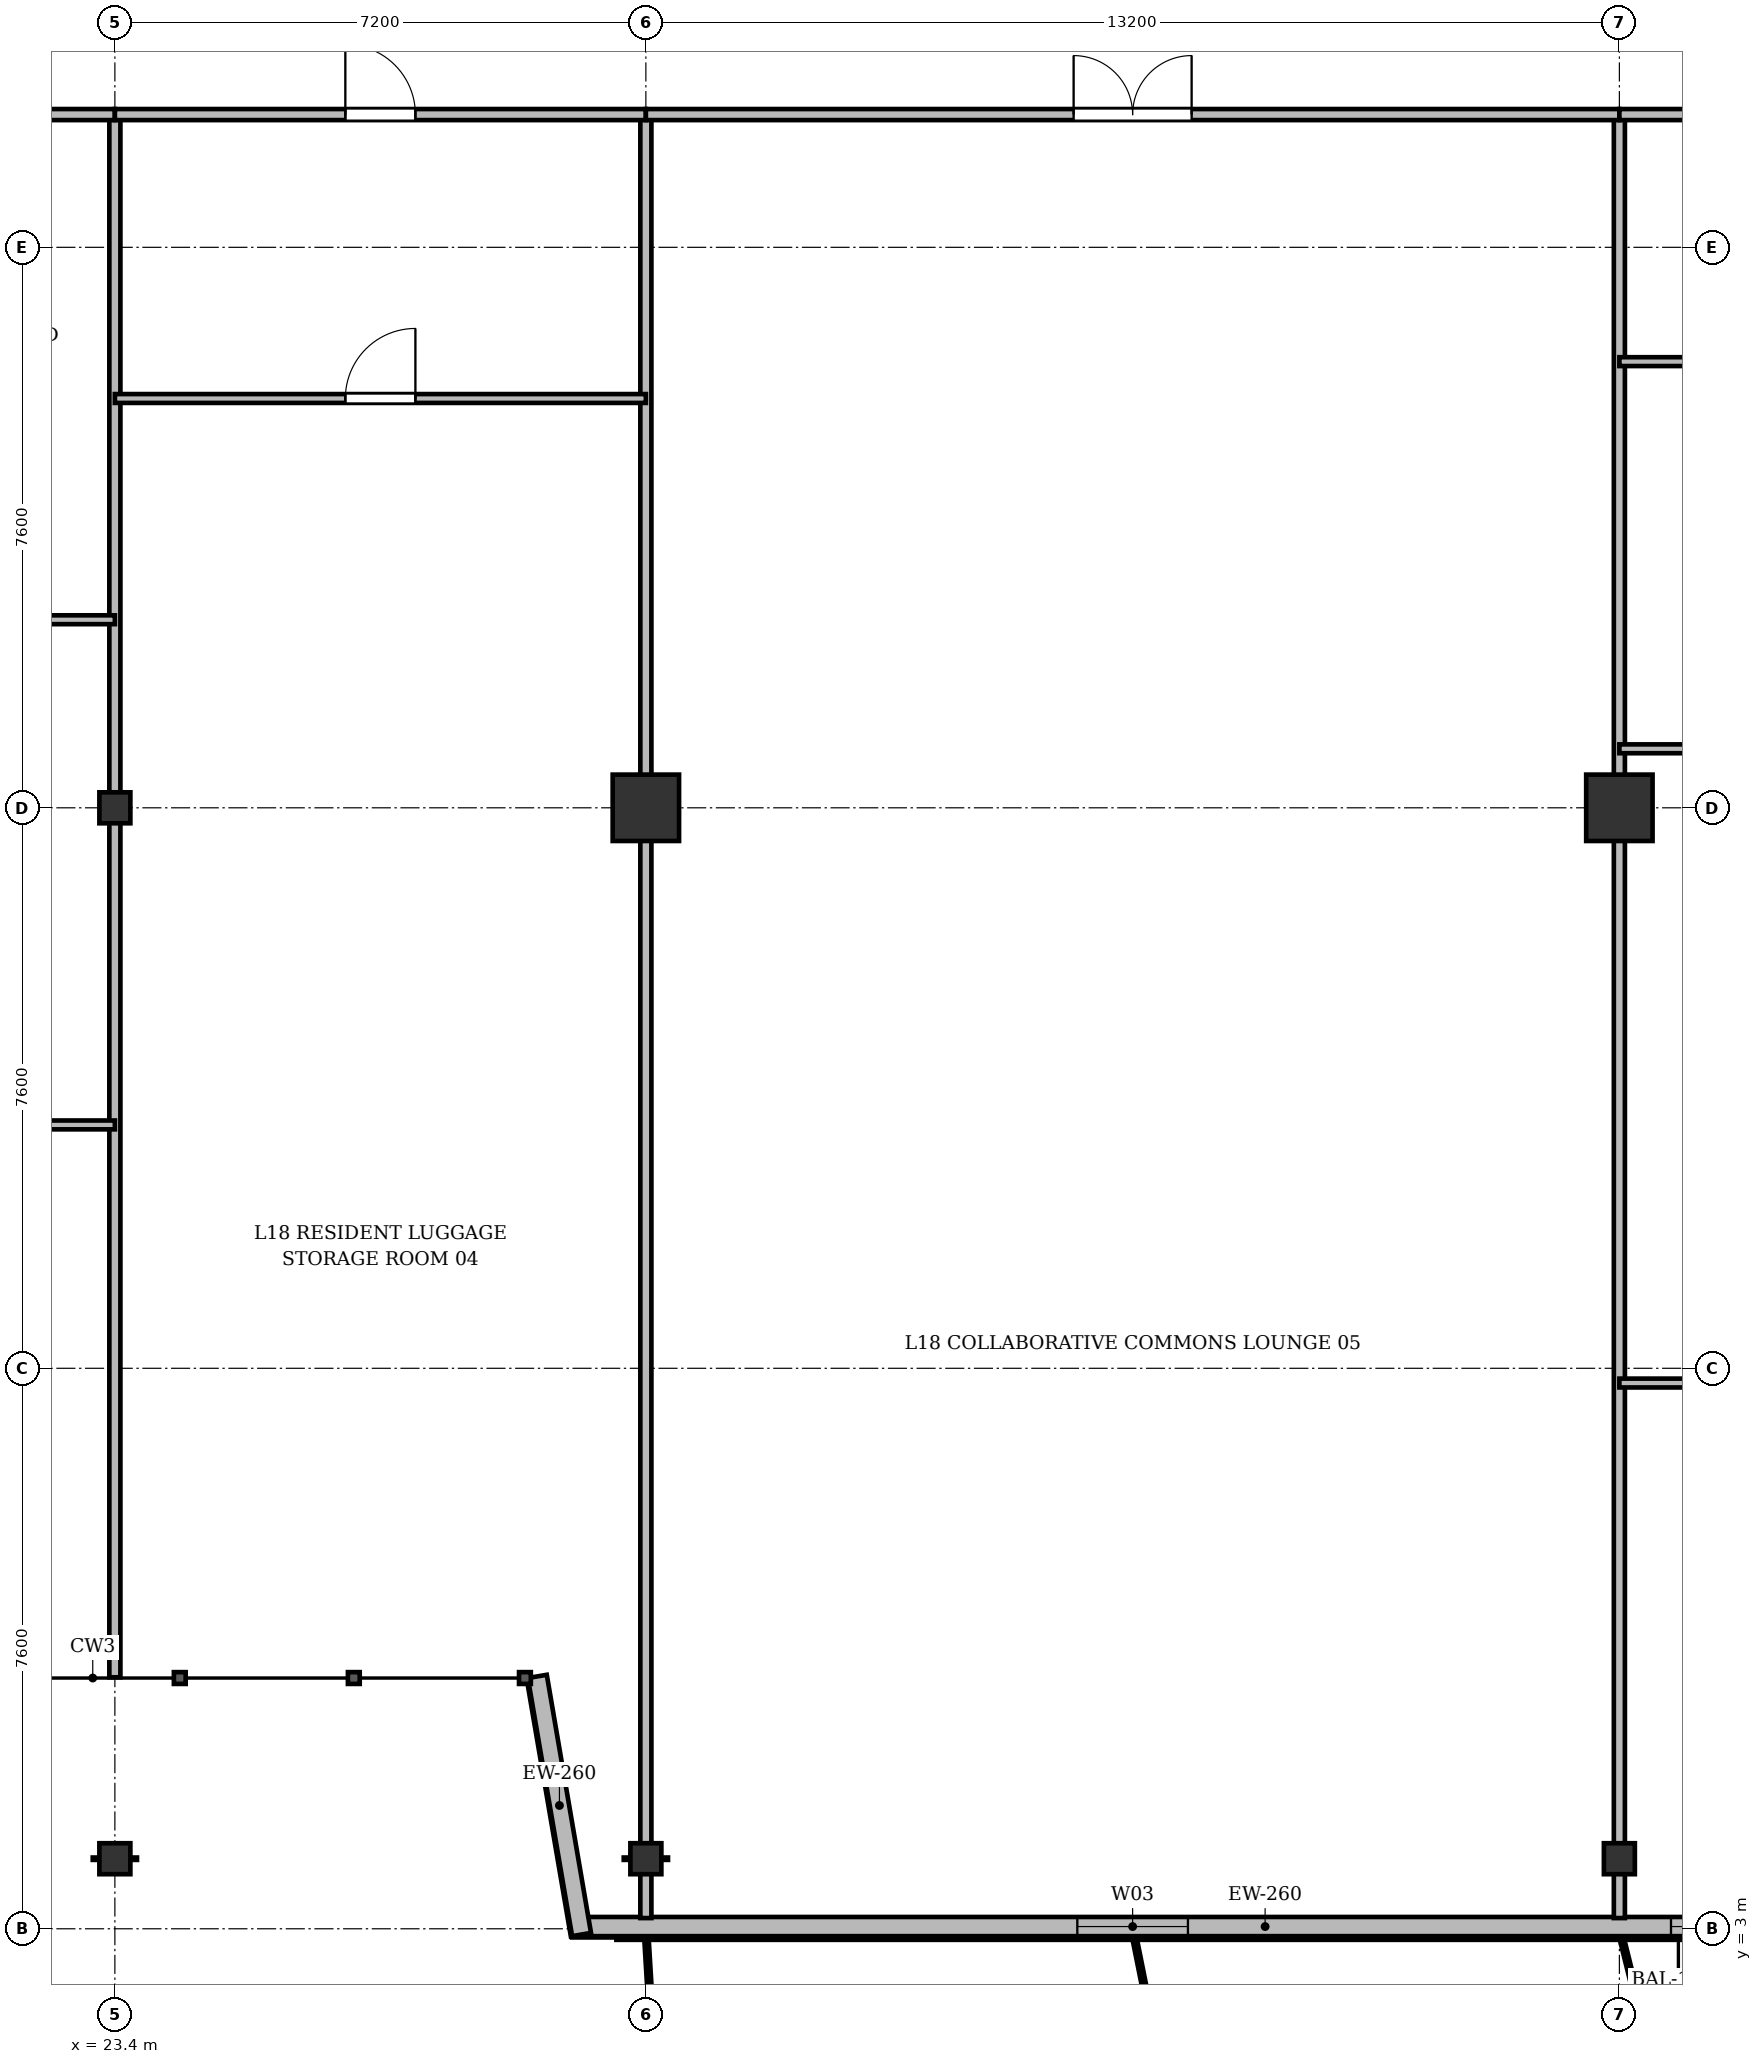
"""IFC4 building model, lengths in metres.
Left out: names, types, materials, properties, quantities, classifications, styles, units other than length and angle.
Written with IfcOpenShell. Run it as: python <this file> out.ifc"""

import sys

from ifc_helpers import new_model, si_unit, direction, frame, frame_2d, origin, origin_2d, place, context, subcontext, project, spatial, rectangle, i_section, extrude, source, transform, mapped, element, fill, save


model = new_model("IFC4")
c1 = context("Model", 3, precision=1e-05, world=origin(), true_north=direction((0.0, 1.0)))
c2 = subcontext(c1, "Body", "Model", "MODEL_VIEW")
j1 = project(units=[si_unit("LENGTHUNIT", "METRE"), si_unit("PLANEANGLEUNIT", "RADIAN")], contexts=[c1])
p1 = place(None, origin())
s1 = spatial("IfcSite", under=j1, at=p1, CompositionType="ELEMENT")
p2 = place(p1, origin())
s2 = spatial("IfcBuilding", under=s1, at=p2, CompositionType="ELEMENT")
p3 = place(p2, frame((0.0, 0.0, 70.3)))
s3 = spatial("IfcBuildingStorey", under=s2, at=p3, CompositionType="ELEMENT", Elevation=70.3)
m1 = source(origin(), c2, "Body", "SweptSolid", [
    extrude(i_section(OverallWidth=0.42, OverallDepth=0.42, WebThickness=0.026, FlangeThickness=0.04, at=origin_2d()), origin(), (0.0, 0.0, 1.0), 3.6),
])
for number, where, z_axis, x_axis in (
    (1, (23.4, 3.95, 0.0), (0.0, 0.0, 1.0), (1.0, 0.0, 0.0)),
    (2, (23.4, 18.2, 0.0), (0.0, 0.0, 1.0), (1.0, 0.0, 0.0)),
    (3, (30.6, 3.95, 0.0), (0.0, 0.0, 1.0), (1.0, 0.0, 0.0)),
):
    element("IfcColumn", number, at=place(p3, frame(where, z_axis=z_axis, x_axis=x_axis)), inside=s3, PredefinedType="COLUMN", context=c2, shape_type="MappedRepresentation", body=[
        mapped(m1, transform((0.0, 0.0, 0.0), x_axis=(1.0, 0.0, 0.0), y_axis=(0.0, 1.0, 0.0), z_axis=(0.0, 0.0, 1.0), scale=1.0)),
    ])
m2 = source(origin(), c2, "Body", "SweptSolid", [
    extrude(rectangle(XDim=0.9, YDim=0.9, at=origin_2d()), origin(), (0.0, 0.0, 1.0), 3.6),
])
p4 = place(p3, frame((30.6, 18.2, 0.0), z_axis=(0.0, 0.0, 1.0), x_axis=(1.0, 0.0, 0.0)))
e4 = element("IfcColumn", 4, at=p4, inside=s3, PredefinedType="COLUMN", context=c2, shape_type="MappedRepresentation", body=[
    mapped(m2, transform((0.0, 0.0, 0.0), x_axis=(1.0, 0.0, 0.0), y_axis=(0.0, 1.0, 0.0), z_axis=(0.0, 0.0, 1.0), scale=1.0)),
])
p5 = place(p3, frame((43.8, 3.95, 0.0), z_axis=(0.0, 0.0, 1.0), x_axis=(1.0, 0.0, 0.0)))
e5 = element("IfcColumn", 5, at=p5, inside=s3, PredefinedType="COLUMN", context=c2, shape_type="MappedRepresentation", body=[
    mapped(m1, transform((0.0, 0.0, 0.0), x_axis=(1.0, 0.0, 0.0), y_axis=(0.0, 1.0, 0.0), z_axis=(0.0, 0.0, 1.0), scale=1.0)),
])
p6 = place(p3, frame((43.8, 18.2, 0.0), z_axis=(0.0, 0.0, 1.0), x_axis=(1.0, 0.0, 0.0)))
e6 = element("IfcColumn", 6, at=p6, inside=s3, PredefinedType="COLUMN", context=c2, shape_type="MappedRepresentation", body=[
    mapped(m2, transform((0.0, 0.0, 0.0), x_axis=(1.0, 0.0, 0.0), y_axis=(0.0, 1.0, 0.0), z_axis=(0.0, 0.0, 1.0), scale=1.0)),
])
p7 = place(p3, frame((66.9, 3.03, 0.0), z_axis=(0.0, 0.0, 1.0), x_axis=(-1.0, 0.0, 0.0)))
e7 = element("IfcWall", 7, at=p7, inside=s3, PredefinedType="SOLIDWALL", context=c2, shape_type="SweptSolid", body=[
    extrude(rectangle(XDim=37.3, YDim=0.26, at=frame_2d((18.65, 0.0))), origin(), (0.0, 0.0, 1.0), 3.22),
])
p8 = place(p7, frame((3.095, 0.0, 0.9)))
e8 = element("IfcOpeningElement", 8, at=p8, cuts=e7, PredefinedType="OPENING", context=c2, shape_type="SweptSolid", body=[
    extrude(rectangle(XDim=2.0, YDim=1.95, at=frame_2d((1.0, 0.975))), frame((0.0, 0.14, 0.0), z_axis=(0.0, -1.0, 0.0), x_axis=(1.0, 0.0, 0.0)), (0.0, 0.0, 1.0), 0.28),
])
p9 = place(p7, frame((11.175, 0.0, 0.9)))
e9 = element("IfcOpeningElement", 9, at=p9, cuts=e7, PredefinedType="OPENING", context=c2, shape_type="SweptSolid", body=[
    extrude(rectangle(XDim=1.65, YDim=1.85, at=frame_2d((0.825, 0.925))), frame((0.0, 0.14, 0.0), z_axis=(0.0, -1.0, 0.0), x_axis=(1.0, 0.0, 0.0)), (0.0, 0.0, 1.0), 0.28),
])
p10 = place(p7, frame((17.007, 0.0, 0.0)))
e10 = element("IfcOpeningElement", 10, at=p10, cuts=e7, PredefinedType="OPENING", context=c2, shape_type="SweptSolid", body=[
    extrude(rectangle(XDim=1.2, YDim=2.2, at=frame_2d((0.6, 1.1))), frame((0.0, 0.14, 0.0), z_axis=(0.0, -1.0, 0.0), x_axis=(1.0, 0.0, 0.0)), (0.0, 0.0, 1.0), 0.28),
])
p11 = place(p7, frame((20.2, 0.0, 0.9)))
e11 = element("IfcOpeningElement", 11, at=p11, cuts=e7, PredefinedType="OPENING", context=c2, shape_type="SweptSolid", body=[
    extrude(rectangle(XDim=2.2, YDim=1.8, at=frame_2d((1.1, 0.9))), frame((0.0, 0.14, 0.0), z_axis=(0.0, -1.0, 0.0), x_axis=(1.0, 0.0, 0.0)), (0.0, 0.0, 1.0), 0.28),
])
p12 = place(p7, frame((28.95, 0.0, 0.9)))
e12 = element("IfcOpeningElement", 12, at=p12, cuts=e7, PredefinedType="OPENING", context=c2, shape_type="SweptSolid", body=[
    extrude(rectangle(XDim=1.5, YDim=1.75, at=frame_2d((0.75, 0.875))), frame((0.0, 0.14, 0.0), z_axis=(0.0, -1.0, 0.0), x_axis=(1.0, 0.0, 0.0)), (0.0, 0.0, 1.0), 0.28),
])
p13 = place(p3, frame((29.728, 2.922, 0.0), z_axis=(0.0, 0.0, 1.0), x_axis=(-0.168923741424, 0.98562912375, 0.0)))
e13 = element("IfcWall", 13, at=p13, inside=s3, PredefinedType="SOLIDWALL", context=c2, shape_type="SweptSolid", body=[
    extrude(rectangle(XDim=3.551, YDim=0.26, at=frame_2d((1.775, 0.0))), origin(), (0.0, 0.0, 1.0), 2.57),
])
p14 = place(p3, frame((23.4, 6.41, 0.0), z_axis=(0.0, 0.0, 1.0), x_axis=(0.0, 1.0, 0.0)))
e14 = element("IfcWall", 14, at=p14, inside=s3, PredefinedType="PARTITIONING", context=c2, shape_type="SweptSolid", body=[
    extrude(rectangle(XDim=21.19, YDim=0.15, at=frame_2d((10.595, 0.0))), origin(), (0.0, 0.0, 1.0), 2.632),
])
for number, where, z_axis, x_axis in (
    (15, (30.6, 3.145, 0.0), (0.0, 0.0, 1.0), (0.0, 1.0, 0.0)),
    (16, (43.8, 3.145, 0.0), (0.0, 0.0, 1.0), (0.0, 1.0, 0.0)),
):
    element("IfcWall", number, at=place(p3, frame(where, z_axis=z_axis, x_axis=x_axis)), inside=s3, PredefinedType="PARTITIONING", context=c2, shape_type="SweptSolid", body=[
        extrude(rectangle(XDim=24.455, YDim=0.15, at=frame_2d((12.228, 0.0))), origin(), (0.0, 0.0, 1.0), 2.632),
    ])
p15 = place(p3, frame((15.6, 20.75, 0.0), z_axis=(0.0, 0.0, 1.0), x_axis=(1.0, 0.0, 0.0)))
e17 = element("IfcWall", 17, at=p15, inside=s3, PredefinedType="PARTITIONING", context=c2, shape_type="SweptSolid", body=[
    extrude(rectangle(XDim=7.8, YDim=0.12, at=frame_2d((3.9, 0.0))), origin(), (0.0, 0.0, 1.0), 2.632),
])
p16 = place(p15, frame((3.333, 0.0, 0.0)))
e18 = element("IfcOpeningElement", 18, at=p16, cuts=e17, PredefinedType="OPENING", context=c2, shape_type="SweptSolid", body=[
    extrude(rectangle(XDim=0.95, YDim=2.15, at=frame_2d((0.475, 1.075))), frame((0.0, 0.07, 0.0), z_axis=(0.0, -1.0, 0.0), x_axis=(1.0, 0.0, 0.0)), (0.0, 0.0, 1.0), 0.14),
])
p17 = place(p3, frame((15.6, 27.6, 0.0), z_axis=(0.0, 0.0, 1.0), x_axis=(1.0, 0.0, 0.0)))
e19 = element("IfcWall", 19, at=p17, inside=s3, PredefinedType="PARTITIONING", context=c2, shape_type="SweptSolid", body=[
    extrude(rectangle(XDim=7.8, YDim=0.15, at=frame_2d((3.9, 0.0))), origin(), (0.0, 0.0, 1.0), 2.632),
])
p18 = place(p17, frame((5.172, 0.0, 0.0)))
e20 = element("IfcOpeningElement", 20, at=p18, cuts=e19, PredefinedType="OPENING", context=c2, shape_type="SweptSolid", body=[
    extrude(rectangle(XDim=0.95, YDim=2.15, at=frame_2d((0.475, 1.075))), frame((0.0, 0.085, 0.0), z_axis=(0.0, -1.0, 0.0), x_axis=(1.0, 0.0, 0.0)), (0.0, 0.0, 1.0), 0.17),
])
p19 = place(p3, frame((19.5, 13.9, 0.0), z_axis=(0.0, 0.0, 1.0), x_axis=(1.0, 0.0, 0.0)))
e21 = element("IfcWall", 21, at=p19, inside=s3, PredefinedType="PARTITIONING", context=c2, shape_type="SweptSolid", body=[
    extrude(rectangle(XDim=3.9, YDim=0.12, at=frame_2d((1.95, 0.0))), origin(), (0.0, 0.0, 1.0), 2.632),
])
p20 = place(p19, frame((1.475, 0.0, 0.0)))
e22 = element("IfcOpeningElement", 22, at=p20, cuts=e21, PredefinedType="OPENING", context=c2, shape_type="SweptSolid", body=[
    extrude(rectangle(XDim=0.95, YDim=2.15, at=frame_2d((0.475, 1.075))), frame((0.0, 0.07, 0.0), z_axis=(0.0, -1.0, 0.0), x_axis=(1.0, 0.0, 0.0)), (0.0, 0.0, 1.0), 0.14),
])
p21 = place(p3, frame((23.4, 27.6, 0.0), z_axis=(0.0, 0.0, 1.0), x_axis=(1.0, 0.0, 0.0)))
e23 = element("IfcWall", 23, at=p21, inside=s3, PredefinedType="PARTITIONING", context=c2, shape_type="SweptSolid", body=[
    extrude(rectangle(XDim=7.2, YDim=0.15, at=frame_2d((3.6, 0.0))), origin(), (0.0, 0.0, 1.0), 2.632),
])
p22 = place(p21, frame((3.125, 0.0, 0.0)))
e24 = element("IfcOpeningElement", 24, at=p22, cuts=e23, PredefinedType="OPENING", context=c2, shape_type="SweptSolid", body=[
    extrude(rectangle(XDim=0.95, YDim=2.15, at=frame_2d((0.475, 1.075))), frame((0.0, 0.085, 0.0), z_axis=(0.0, -1.0, 0.0), x_axis=(1.0, 0.0, 0.0)), (0.0, 0.0, 1.0), 0.17),
])
p23 = place(p3, frame((23.4, 23.75, 0.0), z_axis=(0.0, 0.0, 1.0), x_axis=(1.0, 0.0, 0.0)))
e25 = element("IfcWall", 25, at=p23, inside=s3, PredefinedType="PARTITIONING", context=c2, shape_type="SweptSolid", body=[
    extrude(rectangle(XDim=7.2, YDim=0.12, at=frame_2d((3.6, 0.0))), origin(), (0.0, 0.0, 1.0), 2.632),
])
p24 = place(p23, frame((3.125, 0.0, 0.0)))
e26 = element("IfcOpeningElement", 26, at=p24, cuts=e25, PredefinedType="OPENING", context=c2, shape_type="SweptSolid", body=[
    extrude(rectangle(XDim=0.95, YDim=2.15, at=frame_2d((0.475, 1.075))), frame((0.0, 0.07, 0.0), z_axis=(0.0, -1.0, 0.0), x_axis=(1.0, 0.0, 0.0)), (0.0, 0.0, 1.0), 0.14),
])
p25 = place(p3, frame((30.6, 27.6, 0.0), z_axis=(0.0, 0.0, 1.0), x_axis=(1.0, 0.0, 0.0)))
e27 = element("IfcWall", 27, at=p25, inside=s3, PredefinedType="PARTITIONING", context=c2, shape_type="SweptSolid", body=[
    extrude(rectangle(XDim=13.2, YDim=0.15, at=frame_2d((6.6, 0.0))), origin(), (0.0, 0.0, 1.0), 2.632),
])
p26 = place(p25, frame((5.8, 0.0, 0.0)))
e28 = element("IfcOpeningElement", 28, at=p26, cuts=e27, PredefinedType="OPENING", context=c2, shape_type="SweptSolid", body=[
    extrude(rectangle(XDim=1.6, YDim=2.2, at=frame_2d((0.8, 1.1))), frame((0.0, 0.085, 0.0), z_axis=(0.0, -1.0, 0.0), x_axis=(1.0, 0.0, 0.0)), (0.0, 0.0, 1.0), 0.17),
])
p27 = place(p3, frame((43.8, 19.0, 0.0), z_axis=(0.0, 0.0, 1.0), x_axis=(1.0, 0.0, 0.0)))
e29 = element("IfcWall", 29, at=p27, inside=s3, PredefinedType="PARTITIONING", context=c2, shape_type="SweptSolid", body=[
    extrude(rectangle(XDim=7.2, YDim=0.12, at=frame_2d((3.6, 0.0))), origin(), (0.0, 0.0, 1.0), 2.632),
])
p28 = place(p27, frame((3.125, 0.0, 0.0)))
e30 = element("IfcOpeningElement", 30, at=p28, cuts=e29, PredefinedType="OPENING", context=c2, shape_type="SweptSolid", body=[
    extrude(rectangle(XDim=0.95, YDim=2.15, at=frame_2d((0.475, 1.075))), frame((0.0, 0.07, 0.0), z_axis=(0.0, -1.0, 0.0), x_axis=(1.0, 0.0, 0.0)), (0.0, 0.0, 1.0), 0.14),
])
p29 = place(p3, frame((43.8, 24.25, 0.0), z_axis=(0.0, 0.0, 1.0), x_axis=(1.0, 0.0, 0.0)))
e31 = element("IfcWall", 31, at=p29, inside=s3, PredefinedType="PARTITIONING", context=c2, shape_type="SweptSolid", body=[
    extrude(rectangle(XDim=2.4, YDim=0.12, at=frame_2d((1.2, 0.0))), origin(), (0.0, 0.0, 1.0), 2.632),
])
p30 = place(p3, frame((43.8, 27.6, 0.0), z_axis=(0.0, 0.0, 1.0), x_axis=(1.0, 0.0, 0.0)))
e32 = element("IfcWall", 32, at=p30, inside=s3, PredefinedType="PARTITIONING", context=c2, shape_type="SweptSolid", body=[
    extrude(rectangle(XDim=7.2, YDim=0.15, at=frame_2d((3.6, 0.0))), origin(), (0.0, 0.0, 1.0), 2.632),
])
p31 = place(p30, frame((4.706, 0.0, 0.0)))
e33 = element("IfcOpeningElement", 33, at=p31, cuts=e32, PredefinedType="OPENING", context=c2, shape_type="SweptSolid", body=[
    extrude(rectangle(XDim=0.95, YDim=2.15, at=frame_2d((0.475, 1.075))), frame((0.0, 0.085, 0.0), z_axis=(0.0, -1.0, 0.0), x_axis=(1.0, 0.0, 0.0)), (0.0, 0.0, 1.0), 0.17),
])
p32 = place(p3, frame((43.8, 10.4, 0.0), z_axis=(0.0, 0.0, 1.0), x_axis=(1.0, 0.0, 0.0)))
e34 = element("IfcWall", 34, at=p32, inside=s3, PredefinedType="PARTITIONING", context=c2, shape_type="SweptSolid", body=[
    extrude(rectangle(XDim=3.6, YDim=0.12, at=frame_2d((1.8, 0.0))), origin(), (0.0, 0.0, 1.0), 2.632),
])
p33 = place(p32, frame((1.325, 0.0, 0.0)))
e35 = element("IfcOpeningElement", 35, at=p33, cuts=e34, PredefinedType="OPENING", context=c2, shape_type="SweptSolid", body=[
    extrude(rectangle(XDim=0.95, YDim=2.15, at=frame_2d((0.475, 1.075))), frame((0.0, 0.07, 0.0), z_axis=(0.0, -1.0, 0.0), x_axis=(1.0, 0.0, 0.0)), (0.0, 0.0, 1.0), 0.14),
])
m3 = source(origin(), c2, "Body", "SweptSolid", [
    extrude(rectangle(XDim=2.2, YDim=1.8, at=frame_2d((1.1, 0.9))), frame((0.0, 0.03, 0.0), z_axis=(0.0, -1.0, 0.0), x_axis=(1.0, 0.0, 0.0)), (0.0, 0.0, 1.0), 0.06),
])
p34 = place(p11, origin())
e36 = element("IfcWindow", 36, at=p34, inside=s3, PartitioningType="SINGLE_PANEL", PredefinedType="WINDOW", context=c2, shape_type="MappedRepresentation", body=[
    mapped(m3, transform((0.0, 0.0, 0.0), x_axis=(1.0, 0.0, 0.0), y_axis=(0.0, 1.0, 0.0), z_axis=(0.0, 0.0, 1.0), scale=1.0)),
])
fill(e11, e36)
m4 = source(origin(), c2, "Body", "SweptSolid", [
    extrude(rectangle(XDim=1.5, YDim=1.75, at=frame_2d((0.75, 0.875))), frame((0.0, 0.03, 0.0), z_axis=(0.0, -1.0, 0.0), x_axis=(1.0, 0.0, 0.0)), (0.0, 0.0, 1.0), 0.06),
])
p35 = place(p12, origin())
e37 = element("IfcWindow", 37, at=p35, inside=s3, PartitioningType="SINGLE_PANEL", PredefinedType="WINDOW", context=c2, shape_type="MappedRepresentation", body=[
    mapped(m4, transform((0.0, 0.0, 0.0), x_axis=(1.0, 0.0, 0.0), y_axis=(0.0, 1.0, 0.0), z_axis=(0.0, 0.0, 1.0), scale=1.0)),
])
fill(e12, e37)
m5 = source(origin(), c2, "Body", "SweptSolid", [
    extrude(rectangle(XDim=0.95, YDim=2.15, at=frame_2d((0.475, 1.075))), frame((0.0, 0.025, 0.0), z_axis=(0.0, -1.0, 0.0), x_axis=(1.0, 0.0, 0.0)), (0.0, 0.0, 1.0), 0.05),
])
p36 = place(p22, origin())
e38 = element("IfcDoor", 38, at=p36, inside=s3, OperationType="SINGLE_SWING_LEFT", PredefinedType="DOOR", context=c2, shape_type="MappedRepresentation", body=[
    mapped(m5, transform((0.0, 0.0, 0.0), x_axis=(1.0, 0.0, 0.0), y_axis=(0.0, 1.0, 0.0), z_axis=(0.0, 0.0, 1.0), scale=1.0)),
])
fill(e24, e38)
p37 = place(p24, origin())
e39 = element("IfcDoor", 39, at=p37, inside=s3, OperationType="SINGLE_SWING_RIGHT", PredefinedType="DOOR", context=c2, shape_type="MappedRepresentation", body=[
    mapped(m5, transform((0.0, 0.0, 0.0), x_axis=(1.0, 0.0, 0.0), y_axis=(0.0, 1.0, 0.0), z_axis=(0.0, 0.0, 1.0), scale=1.0)),
])
fill(e26, e39)
m6 = source(origin(), c2, "Body", "SweptSolid", [
    extrude(rectangle(XDim=1.6, YDim=2.2, at=frame_2d((0.8, 1.1))), frame((0.0, 0.025, 0.0), z_axis=(0.0, -1.0, 0.0), x_axis=(1.0, 0.0, 0.0)), (0.0, 0.0, 1.0), 0.05),
])
p38 = place(p26, origin())
e40 = element("IfcDoor", 40, at=p38, inside=s3, OperationType="DOUBLE_DOOR_SINGLE_SWING", PredefinedType="DOOR", context=c2, shape_type="MappedRepresentation", body=[
    mapped(m6, transform((0.0, 0.0, 0.0), x_axis=(1.0, 0.0, 0.0), y_axis=(0.0, 1.0, 0.0), z_axis=(0.0, 0.0, 1.0), scale=1.0)),
])
fill(e28, e40)
save(model, sys.argv[1])
